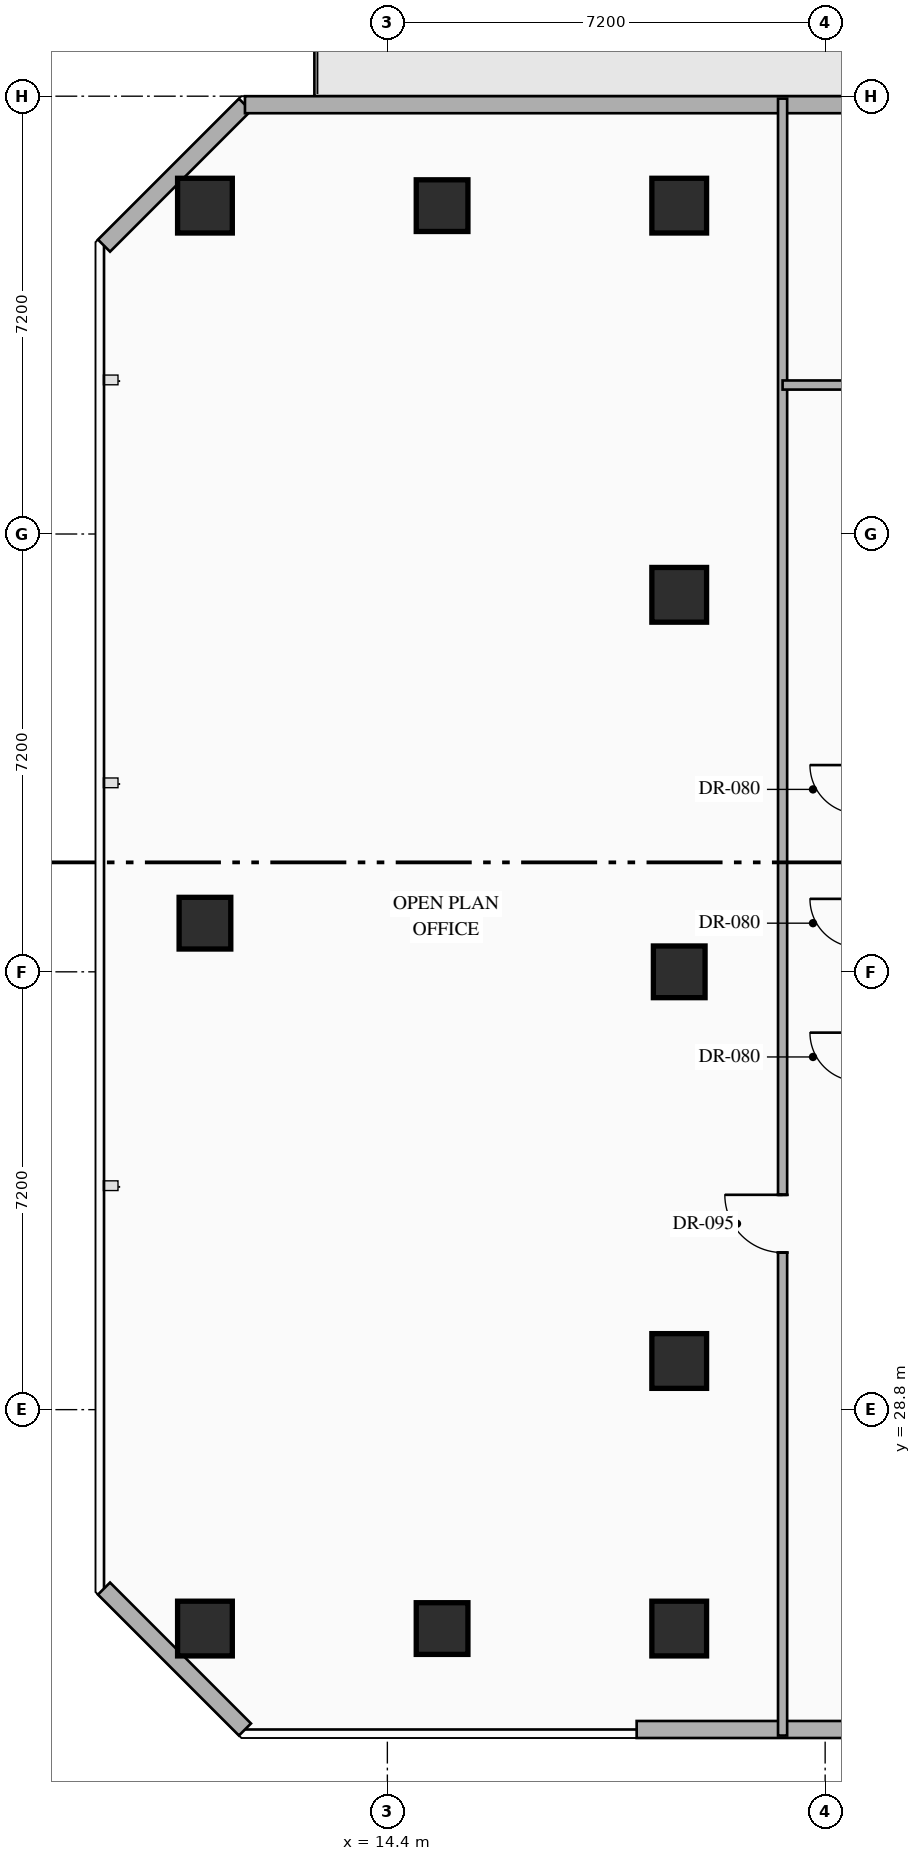
"""IFC4 building model, lengths in metres.
Left out: names, types, materials, properties, quantities, classifications, styles, units other than length and angle.
Written with IfcOpenShell. Run it as: python <this file> out.ifc"""

import sys

from ifc_helpers import new_model, si_unit, direction, frame, frame_2d, origin, origin_2d, place, context, subcontext, project, spatial, rectangle, hollow_rectangle, extrude, element, fill, save


model = new_model("IFC4")
c1 = context("Model", 3, precision=1e-05, world=origin(), true_north=direction((0.0, 1.0)))
c2 = subcontext(c1, "Body", "Model", "MODEL_VIEW")
j1 = project(units=[si_unit("LENGTHUNIT", "METRE"), si_unit("PLANEANGLEUNIT", "RADIAN")], contexts=[c1])
p1 = place(None, origin())
s1 = spatial("IfcSite", under=j1, at=p1, CompositionType="ELEMENT")
p2 = place(p1, origin())
s2 = spatial("IfcBuilding", under=s1, at=p2, CompositionType="ELEMENT")
p3 = place(p2, frame((0.0, 0.0, 126.45)))
s3 = spatial("IfcBuildingStorey", under=s2, at=p3, CompositionType="ELEMENT", Elevation=126.45)
for number, where, z_axis, x_axis in (
    (1, (11.4, 25.2, 0.0), (0.0, 0.0, 1.0), (1.0, 0.0, 0.0)),
    (2, (11.4, 48.6, 0.0), (0.0, 0.0, 1.0), (1.0, 0.0, 0.0)),
    (3, (19.2, 48.6, 0.0), (0.0, 0.0, 1.0), (1.0, 0.0, 0.0)),
    (4, (19.2, 25.2, 0.0), (0.0, 0.0, 1.0), (1.0, 0.0, 0.0)),
    (5, (19.2, 29.6, 0.0), (0.0, 0.0, 1.0), (1.0, 0.0, 0.0)),
    (6, (19.2, 42.2, 0.0), (0.0, 0.0, 1.0), (1.0, 0.0, 0.0)),
):
    element("IfcColumn", number, at=place(p3, frame(where, z_axis=z_axis, x_axis=x_axis)), inside=s3, PredefinedType="COLUMN", context=c2, shape_type="SweptSolid", body=[
        extrude(hollow_rectangle(XDim=0.9, YDim=0.9, WallThickness=0.036, at=origin_2d()), origin(), (0.0, 0.0, 1.0), 3.6),
    ])
for number, where, z_axis, x_axis in (
    (7, (11.4, 36.8, 0.0), (0.0, 0.0, 1.0), (1.0, 0.0, 0.0)),
    (8, (19.2, 36.0, 0.0), (0.0, 0.0, 1.0), (1.0, 0.0, 0.0)),
    (9, (15.3, 25.2, 0.0), (0.0, 0.0, 1.0), (1.0, 0.0, 0.0)),
    (10, (15.3, 48.6, 0.0), (0.0, 0.0, 1.0), (1.0, 0.0, 0.0)),
):
    element("IfcColumn", number, at=place(p3, frame(where, z_axis=z_axis, x_axis=x_axis)), inside=s3, PredefinedType="COLUMN", context=c2, shape_type="SweptSolid", body=[
        extrude(hollow_rectangle(XDim=0.85, YDim=0.85, WallThickness=0.032, at=origin_2d()), origin(), (0.0, 0.0, 1.0), 3.6),
    ])
p4 = place(p3, frame((25.247, 23.54, 0.0), z_axis=(0.0, 0.0, 1.0), x_axis=(-1.0, 0.0, 0.0)))
e11 = element("IfcWall", 11, at=p4, inside=s3, PredefinedType="STANDARD", context=c2, shape_type="SweptSolid", body=[
    extrude(rectangle(XDim=6.747, YDim=0.28, at=frame_2d((3.374, 0.0))), origin(), (0.0, 0.0, 1.0), 3.34),
])
p5 = place(p3, frame((12.058, 23.54, 0.0), z_axis=(0.0, 0.0, 1.0), x_axis=(-0.707144017911, 0.707069542501, 0.0)))
e12 = element("IfcWall", 12, at=p5, inside=s3, PredefinedType="STANDARD", context=c2, shape_type="SweptSolid", body=[
    extrude(rectangle(XDim=3.278, YDim=0.28, at=frame_2d((1.639, 0.0))), origin(), (0.0, 0.0, 1.0), 3.34),
])
p6 = place(p3, frame((9.74, 47.942, 0.0), z_axis=(0.0, 0.0, 1.0), x_axis=(0.707106781187, 0.707106781187, 0.0)))
e13 = element("IfcWall", 13, at=p6, inside=s3, PredefinedType="STANDARD", context=c2, shape_type="SweptSolid", body=[
    extrude(rectangle(XDim=3.278, YDim=0.28, at=frame_2d((1.639, 0.0))), origin(), (0.0, 0.0, 1.0), 3.34),
])
p7 = place(p3, frame((12.058, 50.26, 0.0), z_axis=(0.0, 0.0, 1.0), x_axis=(1.0, 0.0, 0.0)))
e14 = element("IfcWall", 14, at=p7, inside=s3, PredefinedType="STANDARD", context=c2, shape_type="SweptSolid", body=[
    extrude(rectangle(XDim=30.484, YDim=0.28, at=frame_2d((15.242, 0.0))), origin(), (0.0, 0.0, 1.0), 3.34),
])
p8 = place(p7, frame((14.992, 0.0, 0.0)))
e15 = element("IfcOpeningElement", 15, at=p8, cuts=e14, PredefinedType="OPENING", context=c2, shape_type="SweptSolid", body=[
    extrude(rectangle(XDim=1.1, YDim=2.2, at=frame_2d((0.55, 1.1))), frame((0.0, 0.15, 0.0), z_axis=(0.0, -1.0, 0.0), x_axis=(1.0, 0.0, 0.0)), (0.0, 0.0, 1.0), 0.3),
])
p9 = place(p7, frame((10.074, 0.0, 0.85)))
e16 = element("IfcOpeningElement", 16, at=p9, cuts=e14, PredefinedType="OPENING", context=c2, shape_type="SweptSolid", body=[
    extrude(rectangle(XDim=1.8, YDim=2.1, at=frame_2d((0.9, 1.05))), frame((0.0, 0.15, 0.0), z_axis=(0.0, -1.0, 0.0), x_axis=(1.0, 0.0, 0.0)), (0.0, 0.0, 1.0), 0.3),
])
p10 = place(p3, frame((20.9, 23.44, 0.0), z_axis=(0.0, 0.0, 1.0), x_axis=(0.0, 1.0, 0.0)))
e17 = element("IfcWall", 17, at=p10, inside=s3, PredefinedType="PARTITIONING", context=c2, shape_type="SweptSolid", body=[
    extrude(rectangle(XDim=26.92, YDim=0.15, at=frame_2d((13.46, 0.0))), origin(), (0.0, 0.0, 1.0), 3.34),
])
p11 = place(p10, frame((7.943, 0.0, 0.0)))
e18 = element("IfcOpeningElement", 18, at=p11, cuts=e17, PredefinedType="OPENING", context=c2, shape_type="SweptSolid", body=[
    extrude(rectangle(XDim=0.95, YDim=2.15, at=frame_2d((0.475, 1.075))), frame((0.0, 0.085, 0.0), z_axis=(0.0, -1.0, 0.0), x_axis=(1.0, 0.0, 0.0)), (0.0, 0.0, 1.0), 0.17),
])
p12 = place(p3, frame((20.9, 45.65, 0.0), z_axis=(0.0, 0.0, 1.0), x_axis=(1.0, 0.0, 0.0)))
e19 = element("IfcWall", 19, at=p12, inside=s3, PredefinedType="PARTITIONING", context=c2, shape_type="SweptSolid", body=[
    extrude(rectangle(XDim=24.06, YDim=0.15, at=frame_2d((12.03, 0.0))), origin(), (0.0, 0.0, 1.0), 2.695),
])
p13 = place(p12, frame((9.32, 0.0, 0.0)))
e20 = element("IfcOpeningElement", 20, at=p13, cuts=e19, PredefinedType="OPENING", context=c2, shape_type="SweptSolid", body=[
    extrude(rectangle(XDim=0.95, YDim=2.15, at=frame_2d((0.475, 1.075))), frame((0.0, 0.085, 0.0), z_axis=(0.0, -1.0, 0.0), x_axis=(1.0, 0.0, 0.0)), (0.0, 0.0, 1.0), 0.17),
])
p14 = place(p11, origin())
e21 = element("IfcDoor", 21, at=p14, inside=s3, OperationType="SINGLE_SWING_RIGHT", PredefinedType="DOOR", context=c2, shape_type="SweptSolid", body=[
    extrude(rectangle(XDim=0.95, YDim=2.15, at=frame_2d((0.475, 1.075))), frame((0.0, 0.025, 0.0), z_axis=(0.0, -1.0, 0.0), x_axis=(1.0, 0.0, 0.0)), (0.0, 0.0, 1.0), 0.05),
])
fill(e18, e21)
save(model, sys.argv[1])
